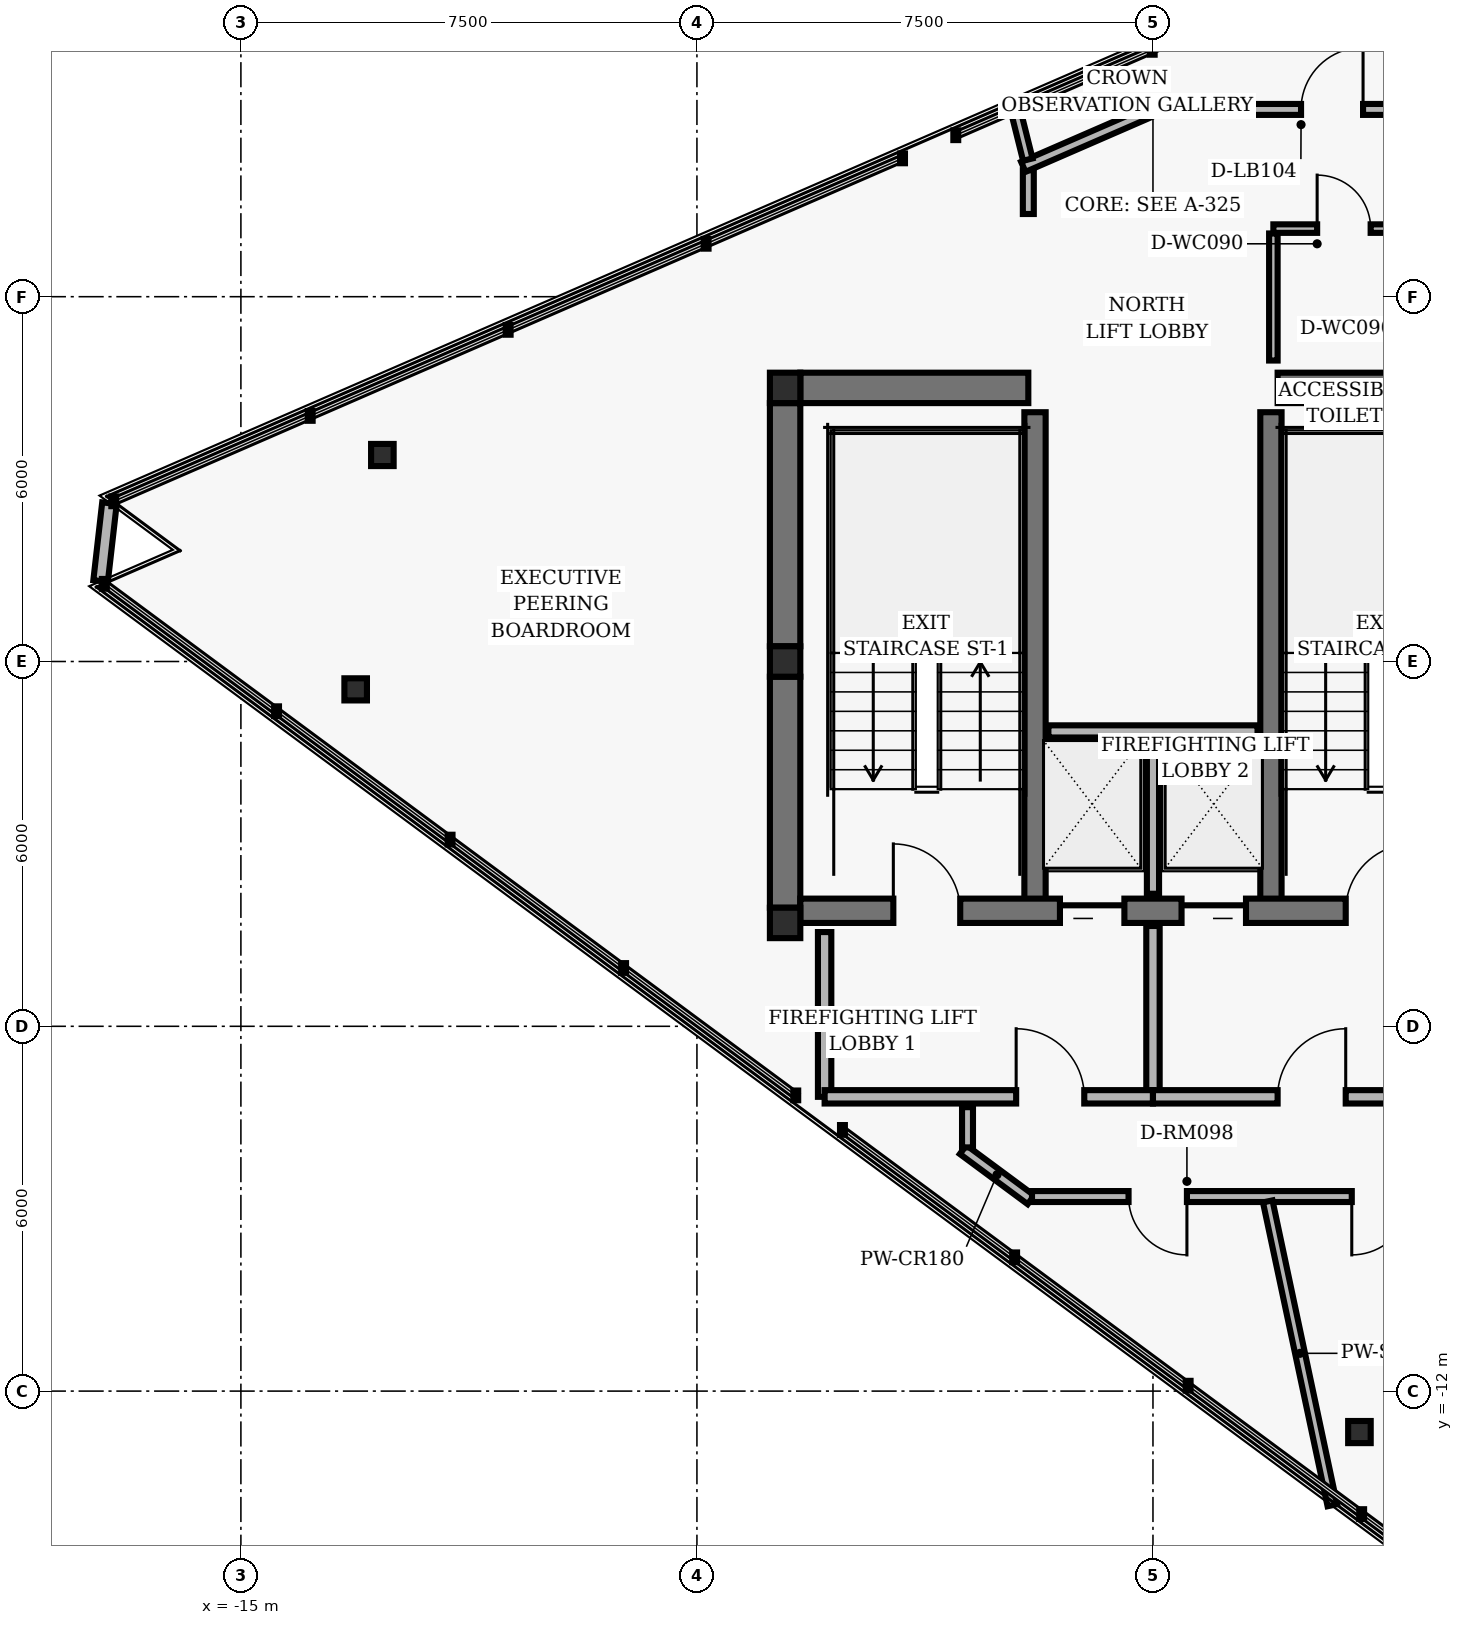
"""IFC4 building model, lengths in metres.
Left out: names, types, materials, properties, quantities, classifications, styles, units other than length and angle.
Written with IfcOpenShell. Run it as: python <this file> out.ifc"""

import sys

from ifc_helpers import new_model, si_unit, direction, frame, frame_2d, origin, origin_2d, place, context, subcontext, project, spatial, rectangle, hollow_rectangle, i_section, extrude, element, fill, save


model = new_model("IFC4")
c1 = context("Model", 3, precision=1e-05, world=origin(), true_north=direction((0.0, 1.0)))
c2 = subcontext(c1, "Body", "Model", "MODEL_VIEW")
j1 = project(units=[si_unit("LENGTHUNIT", "METRE"), si_unit("PLANEANGLEUNIT", "RADIAN")], contexts=[c1])
p1 = place(None, origin())
s1 = spatial("IfcSite", under=j1, at=p1, CompositionType="ELEMENT")
p2 = place(p1, origin())
s2 = spatial("IfcBuilding", under=s1, at=p2, CompositionType="ELEMENT")
p3 = place(p2, frame((0.0, 0.0, 249.12)))
s3 = spatial("IfcBuildingStorey", under=s2, at=p3, CompositionType="ELEMENT", Elevation=249.12)
for number, where, z_axis, x_axis in (
    (1, (-6.05, 4.5, 0.0), (0.0, 0.0, 1.0), (1.0, 0.0, 0.0)),
    (2, (-6.05, 0.0, 0.0), (0.0, 0.0, 1.0), (1.0, 0.0, 0.0)),
    (3, (-6.05, -4.3, 0.0), (0.0, 0.0, 1.0), (1.0, 0.0, 0.0)),
):
    element("IfcColumn", number, at=place(p3, frame(where, z_axis=z_axis, x_axis=x_axis)), inside=s3, PredefinedType="COLUMN", context=c2, shape_type="SweptSolid", body=[
        extrude(hollow_rectangle(XDim=0.5, YDim=0.5, WallThickness=0.02, InnerFilletRadius=0.02, OuterFilletRadius=0.04, at=origin_2d()), origin(), (0.0, 0.0, 1.0), 2.88),
    ])
p4 = place(p3, frame((-6.05, 0.25, 0.0), z_axis=(0.0, 0.0, 1.0), x_axis=(0.0, 1.0, 0.0)))
e4 = element("IfcWall", 4, at=p4, inside=s3, PredefinedType="SHEAR", context=c2, shape_type="SweptSolid", body=[
    extrude(rectangle(XDim=4.0, YDim=0.5, at=frame_2d((2.0, 0.0))), origin(), (0.0, 0.0, 1.0), 2.648),
])
p5 = place(p3, frame((-6.05, -4.05, 0.0), z_axis=(0.0, 0.0, 1.0), x_axis=(0.0, 1.0, 0.0)))
e5 = element("IfcWall", 5, at=p5, inside=s3, PredefinedType="SHEAR", context=c2, shape_type="SweptSolid", body=[
    extrude(rectangle(XDim=3.8, YDim=0.5, at=frame_2d((1.9, 0.0))), origin(), (0.0, 0.0, 1.0), 2.648),
])
for number, where, z_axis, x_axis in (
    (6, (-1.94, -4.1, 0.0), (0.0, 0.0, 1.0), (0.0, 1.0, 0.0)),
    (7, (1.94, -4.1, 0.0), (0.0, 0.0, 1.0), (0.0, 1.0, 0.0)),
):
    element("IfcWall", number, at=place(p3, frame(where, z_axis=z_axis, x_axis=x_axis)), inside=s3, PredefinedType="SHEAR", context=c2, shape_type="SweptSolid", body=[
        extrude(rectangle(XDim=8.2, YDim=0.35, at=frame_2d((4.1, 0.0))), origin(), (0.0, 0.0, 1.0), 2.648),
    ])
p6 = place(p3, frame((-5.8, -4.1, 0.0), z_axis=(0.0, 0.0, 1.0), x_axis=(1.0, 0.0, 0.0)))
e8 = element("IfcWall", 8, at=p6, inside=s3, PredefinedType="SHEAR", context=c2, shape_type="SweptSolid", body=[
    extrude(rectangle(XDim=11.6, YDim=0.4, at=frame_2d((5.8, 0.0))), origin(), (0.0, 0.0, 1.0), 2.648),
])
p7 = place(p6, frame((1.53, 0.0, 0.0)))
e9 = element("IfcOpeningElement", 9, at=p7, cuts=e8, PredefinedType="OPENING", context=c2, shape_type="SweptSolid", body=[
    extrude(rectangle(XDim=1.1, YDim=2.04, at=frame_2d((0.55, 1.02))), frame((0.0, 0.21, 0.0), z_axis=(0.0, -1.0, 0.0), x_axis=(1.0, 0.0, 0.0)), (0.0, 0.0, 1.0), 0.42),
])
p8 = place(p6, frame((8.97, 0.0, 0.0)))
e10 = element("IfcOpeningElement", 10, at=p8, cuts=e8, PredefinedType="OPENING", context=c2, shape_type="SweptSolid", body=[
    extrude(rectangle(XDim=1.1, YDim=2.04, at=frame_2d((0.55, 1.02))), frame((0.0, 0.21, 0.0), z_axis=(0.0, -1.0, 0.0), x_axis=(1.0, 0.0, 0.0)), (0.0, 0.0, 1.0), 0.42),
])
p9 = place(p6, frame((4.27, 0.0, 0.0)))
e11 = element("IfcOpeningElement", 11, at=p9, cuts=e8, PredefinedType="OPENING", context=c2, shape_type="SweptSolid", body=[
    extrude(rectangle(XDim=1.06, YDim=2.04, at=frame_2d((0.53, 1.02))), frame((0.0, 0.21, 0.0), z_axis=(0.0, -1.0, 0.0), x_axis=(1.0, 0.0, 0.0)), (0.0, 0.0, 1.0), 0.42),
])
p10 = place(p6, frame((6.27, 0.0, 0.0)))
e12 = element("IfcOpeningElement", 12, at=p10, cuts=e8, PredefinedType="OPENING", context=c2, shape_type="SweptSolid", body=[
    extrude(rectangle(XDim=1.06, YDim=2.04, at=frame_2d((0.53, 1.02))), frame((0.0, 0.21, 0.0), z_axis=(0.0, -1.0, 0.0), x_axis=(1.0, 0.0, 0.0)), (0.0, 0.0, 1.0), 0.42),
])
for number, where, z_axis, x_axis in (
    (13, (-5.8, 4.5, 0.0), (0.0, 0.0, 1.0), (1.0, 0.0, 0.0)),
    (14, (2.05, 4.5, 0.0), (0.0, 0.0, 1.0), (1.0, 0.0, 0.0)),
):
    element("IfcWall", number, at=place(p3, frame(where, z_axis=z_axis, x_axis=x_axis)), inside=s3, PredefinedType="SHEAR", context=c2, shape_type="SweptSolid", body=[
        extrude(rectangle(XDim=3.75, YDim=0.5, at=frame_2d((1.875, 0.0))), origin(), (0.0, 0.0, 1.0), 2.648),
    ])
for number, where, z_axis, x_axis in (
    (15, (-12.673, 3.396, 0.0), (0.0, 0.0, 1.0), (1.0, 0.0, 0.0)),
    (16, (-13.113, -0.458, 0.0), (0.0, 0.0, 1.0), (1.0, 0.0, 0.0)),
    (17, (3.396, -12.674, 0.0), (0.0, 0.0, 1.0), (1.0, 0.0, 0.0)),
):
    element("IfcColumn", number, at=place(p3, frame(where, z_axis=z_axis, x_axis=x_axis)), inside=s3, PredefinedType="COLUMN", context=c2, shape_type="SweptSolid", body=[
        extrude(i_section(OverallWidth=0.371, OverallDepth=0.364, WebThickness=0.013, FlangeThickness=0.022, FilletRadius=0.015, at=origin_2d()), origin(), (0.0, 0.0, 1.0), 2.88),
    ])
p11 = place(p3, frame((-17.162, 2.604, 0.0), z_axis=(0.0, 0.0, 1.0), x_axis=(-0.11313504355, -0.993579620323, 0.0)))
e18 = element("IfcWall", 18, at=p11, inside=s3, PredefinedType="PARAPET", context=c2, shape_type="SweptSolid", body=[
    extrude(rectangle(XDim=1.288, YDim=0.24, at=frame_2d((0.644, 0.0))), origin(), (0.0, 0.0, 1.0), 2.168),
])
p12 = place(p3, frame((0.0, -3.82, 0.0), z_axis=(0.0, 0.0, 1.0), x_axis=(0.0, 1.0, 0.0)))
e19 = element("IfcWall", 19, at=p12, inside=s3, PredefinedType="PARTITIONING", context=c2, shape_type="SweptSolid", body=[
    extrude(rectangle(XDim=2.67, YDim=0.2, at=frame_2d((1.335, 0.0))), origin(), (0.0, 0.0, 1.0), 2.623),
])
p13 = place(p3, frame((-1.72, -1.15, 0.0), z_axis=(0.0, 0.0, 1.0), x_axis=(1.0, 0.0, 0.0)))
e20 = element("IfcWall", 20, at=p13, inside=s3, PredefinedType="PARTITIONING", context=c2, shape_type="SweptSolid", body=[
    extrude(rectangle(XDim=3.44, YDim=0.2, at=frame_2d((1.72, 0.0))), origin(), (0.0, 0.0, 1.0), 2.623),
])
p14 = place(p3, frame((-5.4, -7.16, 0.0), z_axis=(0.0, 0.0, 1.0), x_axis=(0.0, 1.0, 0.0)))
e21 = element("IfcWall", 21, at=p14, inside=s3, PredefinedType="PARTITIONING", context=c2, shape_type="SweptSolid", body=[
    extrude(rectangle(XDim=2.71, YDim=0.22, at=frame_2d((1.355, 0.0))), origin(), (0.0, 0.0, 1.0), 2.623),
])
p15 = place(p3, frame((0.0, -7.16, 0.0), z_axis=(0.0, 0.0, 1.0), x_axis=(0.0, 1.0, 0.0)))
e22 = element("IfcWall", 22, at=p15, inside=s3, PredefinedType="PARTITIONING", context=c2, shape_type="SweptSolid", body=[
    extrude(rectangle(XDim=2.81, YDim=0.22, at=frame_2d((1.405, 0.0))), origin(), (0.0, 0.0, 1.0), 2.623),
])
p16 = place(p3, frame((-5.4, -7.16, 0.0), z_axis=(0.0, 0.0, 1.0), x_axis=(1.0, 0.0, 0.0)))
e23 = element("IfcWall", 23, at=p16, inside=s3, PredefinedType="PARTITIONING", context=c2, shape_type="SweptSolid", body=[
    extrude(rectangle(XDim=5.4, YDim=0.22, at=frame_2d((2.7, 0.0))), origin(), (0.0, 0.0, 1.0), 2.623),
])
p17 = place(p16, frame((3.15, 0.0, 0.0)))
e24 = element("IfcOpeningElement", 24, at=p17, cuts=e23, PredefinedType="OPENING", context=c2, shape_type="SweptSolid", body=[
    extrude(rectangle(XDim=1.12, YDim=2.02, at=frame_2d((0.56, 1.01))), frame((0.0, 0.12, 0.0), z_axis=(0.0, -1.0, 0.0), x_axis=(1.0, 0.0, 0.0)), (0.0, 0.0, 1.0), 0.24),
])
p18 = place(p3, frame((0.0, -7.16, 0.0), z_axis=(0.0, 0.0, 1.0), x_axis=(1.0, 0.0, 0.0)))
e25 = element("IfcWall", 25, at=p18, inside=s3, PredefinedType="PARTITIONING", context=c2, shape_type="SweptSolid", body=[
    extrude(rectangle(XDim=4.95, YDim=0.22, at=frame_2d((2.475, 0.0))), origin(), (0.0, 0.0, 1.0), 2.623),
])
p19 = place(p18, frame((2.05, 0.0, 0.0)))
e26 = element("IfcOpeningElement", 26, at=p19, cuts=e25, PredefinedType="OPENING", context=c2, shape_type="SweptSolid", body=[
    extrude(rectangle(XDim=1.12, YDim=2.02, at=frame_2d((0.56, 1.01))), frame((0.0, 0.12, 0.0), z_axis=(0.0, -1.0, 0.0), x_axis=(1.0, 0.0, 0.0)), (0.0, 0.0, 1.0), 0.24),
])
p20 = place(p3, frame((1.98, 4.95, 0.0), z_axis=(0.0, 0.0, 1.0), x_axis=(0.0, 1.0, 0.0)))
e27 = element("IfcWall", 27, at=p20, inside=s3, PredefinedType="PARTITIONING", context=c2, shape_type="SweptSolid", body=[
    extrude(rectangle(XDim=2.09, YDim=0.14, at=frame_2d((1.045, 0.0))), origin(), (0.0, 0.0, 1.0), 2.623),
])
p21 = place(p3, frame((1.98, 7.12, 0.0), z_axis=(0.0, 0.0, 1.0), x_axis=(1.0, 0.0, 0.0)))
e28 = element("IfcWall", 28, at=p21, inside=s3, PredefinedType="PARTITIONING", context=c2, shape_type="SweptSolid", body=[
    extrude(rectangle(XDim=3.86, YDim=0.14, at=frame_2d((1.93, 0.0))), origin(), (0.0, 0.0, 1.0), 2.623),
])
p22 = place(p21, frame((0.72, 0.0, 0.0)))
e29 = element("IfcOpeningElement", 29, at=p22, cuts=e28, PredefinedType="OPENING", context=c2, shape_type="SweptSolid", body=[
    extrude(rectangle(XDim=0.88, YDim=2.02, at=frame_2d((0.44, 1.01))), frame((0.0, 0.08, 0.0), z_axis=(0.0, -1.0, 0.0), x_axis=(1.0, 0.0, 0.0)), (0.0, 0.0, 1.0), 0.16),
])
p23 = place(p21, frame((2.6, 0.0, 0.0)))
e30 = element("IfcOpeningElement", 30, at=p23, cuts=e28, PredefinedType="OPENING", context=c2, shape_type="SweptSolid", body=[
    extrude(rectangle(XDim=0.88, YDim=2.02, at=frame_2d((0.44, 1.01))), frame((0.0, 0.08, 0.0), z_axis=(0.0, -1.0, 0.0), x_axis=(1.0, 0.0, 0.0)), (0.0, 0.0, 1.0), 0.16),
])
p24 = place(p3, frame((-2.007, -8.854, 0.0), z_axis=(0.0, 0.0, 1.0), x_axis=(-0.803868825014, 0.594806617458, 0.0)))
e31 = element("IfcWall", 31, at=p24, inside=s3, PredefinedType="PARTITIONING", context=c2, shape_type="SweptSolid", body=[
    extrude(rectangle(XDim=1.387, YDim=0.18, at=frame_2d((0.694, 0.0))), origin(), (0.0, 0.0, 1.0), 2.203),
])
p25 = place(p3, frame((-3.05, -7.992, 0.0), z_axis=(0.0, 0.0, 1.0), x_axis=(0.0, 1.0, 0.0)))
e32 = element("IfcWall", 32, at=p25, inside=s3, PredefinedType="PARTITIONING", context=c2, shape_type="SweptSolid", body=[
    extrude(rectangle(XDim=0.662, YDim=0.18, at=frame_2d((0.331, 0.0))), origin(), (0.0, 0.0, 1.0), 2.623),
])
p26 = place(p3, frame((-2.05, 7.36, 0.0), z_axis=(0.0, 0.0, 1.0), x_axis=(0.0, 1.0, 0.0)))
e33 = element("IfcWall", 33, at=p26, inside=s3, PredefinedType="PARTITIONING", context=c2, shape_type="SweptSolid", body=[
    extrude(rectangle(XDim=0.721, YDim=0.18, at=frame_2d((0.36, 0.0))), origin(), (0.0, 0.0, 1.0), 2.623),
])
p27 = place(p3, frame((-2.133, 8.135, 0.0), z_axis=(0.0, 0.0, 1.0), x_axis=(0.917076554143, 0.398711165935, 0.0)))
e34 = element("IfcWall", 34, at=p27, inside=s3, PredefinedType="PARTITIONING", context=c2, shape_type="SweptSolid", body=[
    extrude(rectangle(XDim=2.389, YDim=0.18, at=frame_2d((1.195, 0.0))), origin(), (0.0, 0.0, 1.0), 2.203),
])
p28 = place(p3, frame((0.02, 9.08, 0.0), z_axis=(0.0, 0.0, 1.0), x_axis=(1.0, 0.0, 0.0)))
e35 = element("IfcWall", 35, at=p28, inside=s3, PredefinedType="PARTITIONING", context=c2, shape_type="SweptSolid", body=[
    extrude(rectangle(XDim=5.85, YDim=0.18, at=frame_2d((2.925, 0.0))), origin(), (0.0, 0.0, 1.0), 2.623),
])
p29 = place(p28, frame((2.415, 0.0, 0.0)))
e36 = element("IfcOpeningElement", 36, at=p29, cuts=e35, PredefinedType="OPENING", context=c2, shape_type="SweptSolid", body=[
    extrude(rectangle(XDim=1.02, YDim=2.02, at=frame_2d((0.51, 1.01))), frame((0.0, 0.1, 0.0), z_axis=(0.0, -1.0, 0.0), x_axis=(1.0, 0.0, 0.0)), (0.0, 0.0, 1.0), 0.2),
])
p30 = place(p3, frame((5.87, -8.8, 0.0), z_axis=(0.0, 0.0, 1.0), x_axis=(-1.0, 0.0, 0.0)))
e37 = element("IfcWall", 37, at=p30, inside=s3, PredefinedType="PARTITIONING", context=c2, shape_type="SweptSolid", body=[
    extrude(rectangle(XDim=7.86, YDim=0.18, at=frame_2d((3.93, 0.0))), origin(), (0.0, 0.0, 1.0), 2.623),
])
p31 = place(p30, frame((5.312, 0.0, 0.0)))
e38 = element("IfcOpeningElement", 38, at=p31, cuts=e37, PredefinedType="OPENING", context=c2, shape_type="SweptSolid", body=[
    extrude(rectangle(XDim=0.96, YDim=2.02, at=frame_2d((0.48, 1.01))), frame((0.0, 0.1, 0.0), z_axis=(0.0, -1.0, 0.0), x_axis=(1.0, 0.0, 0.0)), (0.0, 0.0, 1.0), 0.2),
])
p32 = place(p30, frame((1.64, 0.0, 0.0)))
e39 = element("IfcOpeningElement", 39, at=p32, cuts=e37, PredefinedType="OPENING", context=c2, shape_type="SweptSolid", body=[
    extrude(rectangle(XDim=0.96, YDim=2.02, at=frame_2d((0.48, 1.01))), frame((0.0, 0.1, 0.0), z_axis=(0.0, -1.0, 0.0), x_axis=(1.0, 0.0, 0.0)), (0.0, 0.0, 1.0), 0.2),
])
p33 = place(p3, frame((1.887, -8.88, 0.0), z_axis=(0.0, 0.0, 1.0), x_axis=(0.207919908666, -0.97814585394, 0.0)))
e40 = element("IfcWall", 40, at=p33, inside=s3, PredefinedType="PARTITIONING", context=c2, shape_type="SweptSolid", body=[
    extrude(rectangle(XDim=5.109, YDim=0.16, at=frame_2d((2.554, 0.0))), origin(), (0.0, 0.0, 1.0), 2.623),
])
p34 = place(p3, frame((-2.058, 8.255, 0.0), z_axis=(0.0, 0.0, 1.0), x_axis=(-0.242030631144, 0.970268608988, 0.0)))
e41 = element("IfcWall", 41, at=p34, inside=s3, PredefinedType="PARTITIONING", context=c2, shape_type="SweptSolid", body=[
    extrude(rectangle(XDim=1.024, YDim=0.16, at=frame_2d((0.512, 0.0))), origin(), (0.0, 0.0, 1.0), 2.623),
])
p35 = place(p7, origin())
e42 = element("IfcDoor", 42, at=p35, inside=s3, OperationType="SINGLE_SWING_LEFT", PredefinedType="DOOR", context=c2, shape_type="SweptSolid", body=[
    extrude(rectangle(XDim=1.1, YDim=2.04, at=frame_2d((0.55, 1.02))), frame((0.0, 0.025, 0.0), z_axis=(0.0, -1.0, 0.0), x_axis=(1.0, 0.0, 0.0)), (0.0, 0.0, 1.0), 0.05),
])
fill(e9, e42)
p36 = place(p8, origin())
e43 = element("IfcDoor", 43, at=p36, inside=s3, OperationType="SINGLE_SWING_RIGHT", PredefinedType="DOOR", context=c2, shape_type="SweptSolid", body=[
    extrude(rectangle(XDim=1.1, YDim=2.04, at=frame_2d((0.55, 1.02))), frame((0.0, 0.025, 0.0), z_axis=(0.0, -1.0, 0.0), x_axis=(1.0, 0.0, 0.0)), (0.0, 0.0, 1.0), 0.05),
])
fill(e10, e43)
p37 = place(p9, origin())
e44 = element("IfcDoor", 44, at=p37, inside=s3, OperationType="SLIDING_TO_LEFT", PredefinedType="DOOR", context=c2, shape_type="SweptSolid", body=[
    extrude(rectangle(XDim=1.06, YDim=2.04, at=frame_2d((0.53, 1.02))), frame((0.0, 0.025, 0.0), z_axis=(0.0, -1.0, 0.0), x_axis=(1.0, 0.0, 0.0)), (0.0, 0.0, 1.0), 0.05),
])
fill(e11, e44)
p38 = place(p10, origin())
e45 = element("IfcDoor", 45, at=p38, inside=s3, OperationType="SLIDING_TO_RIGHT", PredefinedType="DOOR", context=c2, shape_type="SweptSolid", body=[
    extrude(rectangle(XDim=1.06, YDim=2.04, at=frame_2d((0.53, 1.02))), frame((0.0, 0.025, 0.0), z_axis=(0.0, -1.0, 0.0), x_axis=(1.0, 0.0, 0.0)), (0.0, 0.0, 1.0), 0.05),
])
fill(e12, e45)
p39 = place(p17, origin())
e46 = element("IfcDoor", 46, at=p39, inside=s3, OperationType="SINGLE_SWING_LEFT", PredefinedType="DOOR", context=c2, shape_type="SweptSolid", body=[
    extrude(rectangle(XDim=1.12, YDim=2.02, at=frame_2d((0.56, 1.01))), frame((0.0, 0.025, 0.0), z_axis=(0.0, -1.0, 0.0), x_axis=(1.0, 0.0, 0.0)), (0.0, 0.0, 1.0), 0.05),
])
fill(e24, e46)
p40 = place(p19, origin())
e47 = element("IfcDoor", 47, at=p40, inside=s3, OperationType="SINGLE_SWING_RIGHT", PredefinedType="DOOR", context=c2, shape_type="SweptSolid", body=[
    extrude(rectangle(XDim=1.12, YDim=2.02, at=frame_2d((0.56, 1.01))), frame((0.0, 0.025, 0.0), z_axis=(0.0, -1.0, 0.0), x_axis=(1.0, 0.0, 0.0)), (0.0, 0.0, 1.0), 0.05),
])
fill(e26, e47)
p41 = place(p22, origin())
e48 = element("IfcDoor", 48, at=p41, inside=s3, OperationType="SINGLE_SWING_LEFT", PredefinedType="DOOR", context=c2, shape_type="SweptSolid", body=[
    extrude(rectangle(XDim=0.88, YDim=2.02, at=frame_2d((0.44, 1.01))), frame((0.0, 0.025, 0.0), z_axis=(0.0, -1.0, 0.0), x_axis=(1.0, 0.0, 0.0)), (0.0, 0.0, 1.0), 0.05),
])
fill(e29, e48)
p42 = place(p31, origin())
e49 = element("IfcDoor", 49, at=p42, inside=s3, OperationType="SINGLE_SWING_LEFT", PredefinedType="DOOR", context=c2, shape_type="SweptSolid", body=[
    extrude(rectangle(XDim=0.96, YDim=2.02, at=frame_2d((0.48, 1.01))), frame((0.0, 0.025, 0.0), z_axis=(0.0, -1.0, 0.0), x_axis=(1.0, 0.0, 0.0)), (0.0, 0.0, 1.0), 0.05),
])
fill(e38, e49)
p43 = place(p32, origin())
e50 = element("IfcDoor", 50, at=p43, inside=s3, OperationType="SINGLE_SWING_RIGHT", PredefinedType="DOOR", context=c2, shape_type="SweptSolid", body=[
    extrude(rectangle(XDim=0.96, YDim=2.02, at=frame_2d((0.48, 1.01))), frame((0.0, 0.025, 0.0), z_axis=(0.0, -1.0, 0.0), x_axis=(1.0, 0.0, 0.0)), (0.0, 0.0, 1.0), 0.05),
])
fill(e39, e50)
p44 = place(p29, origin())
e51 = element("IfcDoor", 51, at=p44, inside=s3, OperationType="SINGLE_SWING_RIGHT", PredefinedType="DOOR", context=c2, shape_type="SweptSolid", body=[
    extrude(rectangle(XDim=1.02, YDim=2.02, at=frame_2d((0.51, 1.01))), frame((0.0, 0.025, 0.0), z_axis=(0.0, -1.0, 0.0), x_axis=(1.0, 0.0, 0.0)), (0.0, 0.0, 1.0), 0.05),
])
fill(e36, e51)
save(model, sys.argv[1])
